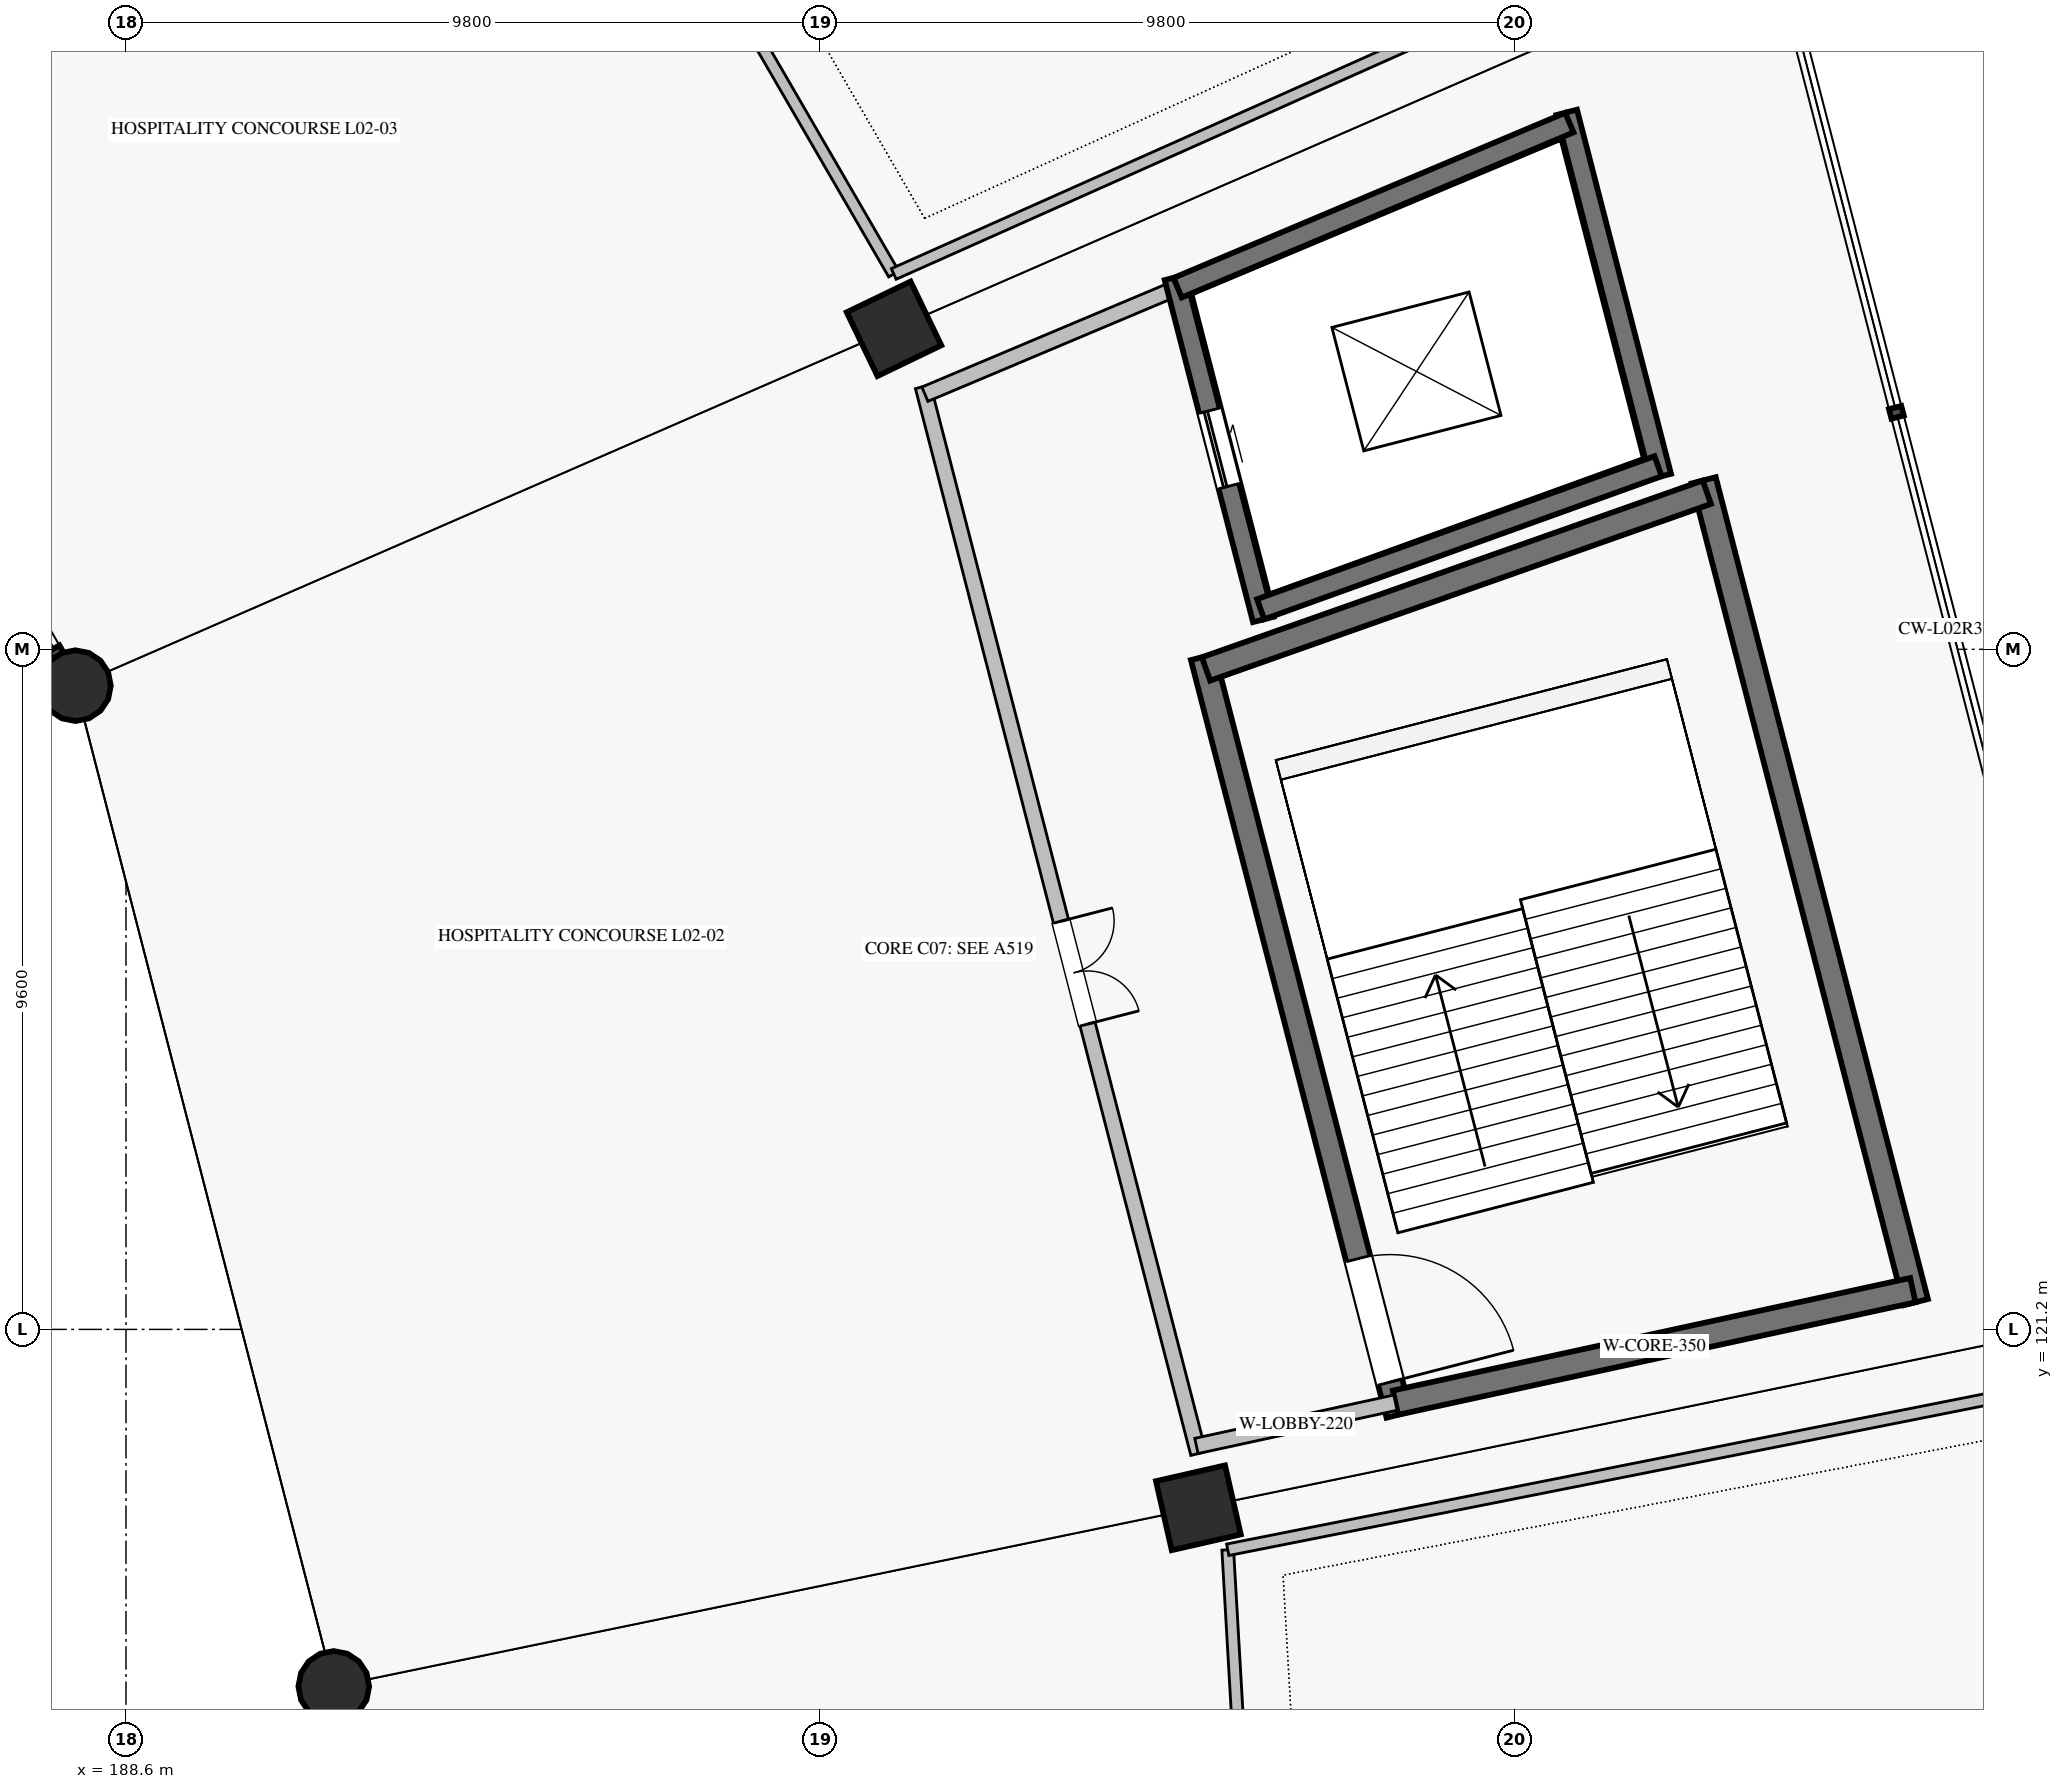
"""IFC4 building model, lengths in metres.
Left out: names, types, materials, properties, quantities, classifications, styles, units other than length and angle.
Written with IfcOpenShell. Run it as: python <this file> out.ifc"""

import sys

from ifc_helpers import new_model, si_unit, direction, frame, frame_2d, origin, origin_2d, place, context, subcontext, project, spatial, rectangle, circle, extrude, element, fill, save


model = new_model("IFC4")
c1 = context("Model", 3, precision=1e-05, world=origin(), true_north=direction((0.0, 1.0)))
c2 = subcontext(c1, "Body", "Model", "MODEL_VIEW")
j1 = project(units=[si_unit("LENGTHUNIT", "METRE"), si_unit("PLANEANGLEUNIT", "RADIAN")], contexts=[c1])
p1 = place(None, origin())
s1 = spatial("IfcSite", under=j1, at=p1, CompositionType="ELEMENT")
p2 = place(p1, origin())
s2 = spatial("IfcBuilding", under=s1, at=p2, CompositionType="ELEMENT")
p3 = place(p2, frame((0.0, 0.0, 10.54)))
s3 = spatial("IfcBuildingStorey", under=s2, at=p3, CompositionType="ELEMENT", Elevation=10.54)
for number, where, z_axis, x_axis in (
    (1, (191.533, 116.16, 0.0), (0.0, 0.0, 1.0), (0.975, 0.223, 0.0)),
    (2, (187.886, 130.287, 0.0), (0.0, 0.0, 1.0), (0.901, 0.434, 0.0)),
):
    element("IfcColumn", number, at=place(p3, frame(where, z_axis=z_axis, x_axis=x_axis)), inside=s3, PredefinedType="COLUMN", context=c2, shape_type="SweptSolid", body=[
        extrude(circle(Radius=0.5, at=origin_2d()), origin(), (0.0, 0.0, 1.0), 5.1),
    ])
for number, where, z_axis, x_axis in (
    (3, (203.738, 118.682, 0.0), (0.0, 0.0, 1.0), (0.975, 0.223, 0.0)),
    (4, (199.441, 135.325, 0.0), (0.0, 0.0, 1.0), (0.901, 0.434, 0.0)),
):
    element("IfcColumn", number, at=place(p3, frame(where, z_axis=z_axis, x_axis=x_axis)), inside=s3, PredefinedType="COLUMN", context=c2, shape_type="SweptSolid", body=[
        extrude(rectangle(XDim=1.0, YDim=1.0, at=origin_2d()), origin(), (0.0, 0.0, 1.0), 5.1),
    ])
p4 = place(p3, frame((206.562, 119.996, 0.0), z_axis=(0.0, 0.0, 1.0), x_axis=(-0.249959564539, 0.968256276042, 0.0)))
e5 = element("IfcWall", 5, at=p4, inside=s3, PredefinedType="SHEAR", context=c2, shape_type="SweptSolid", body=[
    extrude(rectangle(XDim=11.047, YDim=0.35, at=frame_2d((5.523, 0.0))), origin(), (0.0, 0.0, 1.0), 4.84),
])
p5 = place(p4, frame((0.475, 0.0, 0.0)))
e6 = element("IfcOpeningElement", 6, at=p5, cuts=e5, PredefinedType="OPENING", context=c2, shape_type="SweptSolid", body=[
    extrude(rectangle(XDim=1.8, YDim=2.2, at=frame_2d((0.9, 1.1))), frame((0.0, 0.185, 0.0), z_axis=(0.0, -1.0, 0.0), x_axis=(1.0, 0.0, 0.0)), (0.0, 0.0, 1.0), 0.37),
])
p6 = place(p3, frame((213.866, 121.585, 0.0), z_axis=(0.0, 0.0, 1.0), x_axis=(-0.249969221583, 0.968253782983, 0.0)))
e7 = element("IfcWall", 7, at=p6, inside=s3, PredefinedType="SHEAR", context=c2, shape_type="SweptSolid", body=[
    extrude(rectangle(XDim=11.982, YDim=0.35, at=frame_2d((5.991, 0.0))), origin(), (0.0, 0.0, 1.0), 4.84),
])
p7 = place(p3, frame((206.519, 120.166, 0.0), z_axis=(0.0, 0.0, 1.0), x_axis=(0.977149528138, 0.2125530514, 0.0)))
e8 = element("IfcWall", 8, at=p7, inside=s3, PredefinedType="SHEAR", context=c2, shape_type="SweptSolid", body=[
    extrude(rectangle(XDim=7.474, YDim=0.35, at=frame_2d((3.737, 0.0))), origin(), (0.0, 0.0, 1.0), 4.84),
])
p8 = place(p3, frame((203.845, 130.523, 0.0), z_axis=(0.0, 0.0, 1.0), x_axis=(0.943032412173, 0.332700871042, 0.0)))
e9 = element("IfcWall", 9, at=p8, inside=s3, PredefinedType="SHEAR", context=c2, shape_type="SweptSolid", body=[
    extrude(rectangle(XDim=7.497, YDim=0.35, at=frame_2d((3.748, 0.0))), origin(), (0.0, 0.0, 1.0), 4.84),
])
p9 = place(p3, frame((204.654, 131.221, 0.0), z_axis=(0.0, 0.0, 1.0), x_axis=(-0.250003862389, 0.968244839279, 0.0)))
e10 = element("IfcWall", 10, at=p9, inside=s3, PredefinedType="SHEAR", context=c2, shape_type="SweptSolid", body=[
    extrude(rectangle(XDim=4.987, YDim=0.3, at=frame_2d((2.494, 0.0))), origin(), (0.0, 0.0, 1.0), 4.84),
])
p10 = place(p9, frame((1.944, 0.0, 0.0)))
e11 = element("IfcOpeningElement", 11, at=p10, cuts=e10, PredefinedType="OPENING", context=c2, shape_type="SweptSolid", body=[
    extrude(rectangle(XDim=1.1, YDim=2.2, at=frame_2d((0.55, 1.1))), frame((0.0, 0.16, 0.0), z_axis=(0.0, -1.0, 0.0), x_axis=(1.0, 0.0, 0.0)), (0.0, 0.0, 1.0), 0.32),
])
p11 = place(p3, frame((210.264, 133.24, 0.0), z_axis=(0.0, 0.0, 1.0), x_axis=(-0.249961459705, 0.968255786795, 0.0)))
e12 = element("IfcWall", 12, at=p11, inside=s3, PredefinedType="SHEAR", context=c2, shape_type="SweptSolid", body=[
    extrude(rectangle(XDim=5.309, YDim=0.3, at=frame_2d((2.655, 0.0))), origin(), (0.0, 0.0, 1.0), 4.84),
])
p12 = place(p3, frame((204.616, 131.366, 0.0), z_axis=(0.0, 0.0, 1.0), x_axis=(0.940945340179, 0.338558513103, 0.0)))
e13 = element("IfcWall", 13, at=p12, inside=s3, PredefinedType="SHEAR", context=c2, shape_type="SweptSolid", body=[
    extrude(rectangle(XDim=5.962, YDim=0.3, at=frame_2d((2.981, 0.0))), origin(), (0.0, 0.0, 1.0), 4.84),
])
p13 = place(p3, frame((203.445, 135.905, 0.0), z_axis=(0.0, 0.0, 1.0), x_axis=(0.92149593043, 0.388388015007, 0.0)))
e14 = element("IfcWall", 14, at=p13, inside=s3, PredefinedType="SHEAR", context=c2, shape_type="SweptSolid", body=[
    extrude(rectangle(XDim=6.001, YDim=0.3, at=frame_2d((3.0, 0.0))), origin(), (0.0, 0.0, 1.0), 4.84),
])
p14 = place(p3, frame((203.737, 119.448, 0.0), z_axis=(0.0, 0.0, 1.0), x_axis=(-0.249963472505, 0.968255267176, 0.0)))
e15 = element("IfcWall", 15, at=p14, inside=s3, PredefinedType="SOLIDWALL", context=c2, shape_type="SweptSolid", body=[
    extrude(rectangle(XDim=15.553, YDim=0.22, at=frame_2d((7.776, 0.0))), origin(), (0.0, 0.0, 1.0), 3.788),
])
p15 = place(p14, frame((6.26, 0.0, 0.0)))
e16 = element("IfcOpeningElement", 16, at=p15, cuts=e15, PredefinedType="OPENING", context=c2, shape_type="SweptSolid", body=[
    extrude(rectangle(XDim=1.5, YDim=2.2, at=frame_2d((0.75, 1.1))), frame((0.0, 0.12, 0.0), z_axis=(0.0, -1.0, 0.0), x_axis=(1.0, 0.0, 0.0)), (0.0, 0.0, 1.0), 0.24),
])
p16 = place(p3, frame((203.71, 119.555, 0.0), z_axis=(0.0, 0.0, 1.0), x_axis=(0.977160263607, 0.212503692268, 0.0)))
e17 = element("IfcWall", 17, at=p16, inside=s3, PredefinedType="SOLIDWALL", context=c2, shape_type="SweptSolid", body=[
    extrude(rectangle(XDim=2.875, YDim=0.22, at=frame_2d((1.437, 0.0))), origin(), (0.0, 0.0, 1.0), 4.84),
])
p17 = place(p3, frame((199.877, 134.401, 0.0), z_axis=(0.0, 0.0, 1.0), x_axis=(0.921486922561, 0.388409386535, 0.0)))
e18 = element("IfcWall", 18, at=p17, inside=s3, PredefinedType="SOLIDWALL", context=c2, shape_type="SweptSolid", body=[
    extrude(rectangle(XDim=3.871, YDim=0.22, at=frame_2d((1.936, 0.0))), origin(), (0.0, 0.0, 1.0), 4.84),
])
p18 = place(p3, frame((205.041, 102.67, 0.0), z_axis=(0.0, 0.0, 1.0), x_axis=(-0.057603503798, 0.998339539611, 0.0)))
e19 = element("IfcWall", 19, at=p18, inside=s3, PredefinedType="PARTITIONING", context=c2, shape_type="SweptSolid", body=[
    extrude(rectangle(XDim=15.444, YDim=0.165, at=frame_2d((7.722, 0.0))), origin(), (0.0, 0.0, 1.0), 4.16),
])
p19 = place(p18, frame((6.922, 0.0, 0.0)))
e20 = element("IfcOpeningElement", 20, at=p19, cuts=e19, PredefinedType="OPENING", context=c2, shape_type="SweptSolid", body=[
    extrude(rectangle(XDim=1.6, YDim=2.3, at=frame_2d((0.8, 1.15))), frame((0.0, 0.093, 0.0), z_axis=(0.0, -1.0, 0.0), x_axis=(1.0, 0.0, 0.0)), (0.0, 0.0, 1.0), 0.185),
])
p20 = place(p3, frame((204.152, 118.089, 0.0), z_axis=(0.0, 0.0, 1.0), x_axis=(0.980904167784, 0.194491680088, 0.0)))
e21 = element("IfcWall", 21, at=p20, inside=s3, PredefinedType="PARTITIONING", context=c2, shape_type="SweptSolid", body=[
    extrude(rectangle(XDim=12.257, YDim=0.165, at=frame_2d((6.128, 0.0))), origin(), (0.0, 0.0, 1.0), 4.16),
])
p21 = place(p3, frame((199.438, 136.099, 0.0), z_axis=(0.0, 0.0, 1.0), x_axis=(-0.501617777052, 0.865089362867, 0.0)))
e22 = element("IfcWall", 22, at=p21, inside=s3, PredefinedType="PARTITIONING", context=c2, shape_type="SweptSolid", body=[
    extrude(rectangle(XDim=16.464, YDim=0.165, at=frame_2d((8.232, 0.0))), origin(), (0.0, 0.0, 1.0), 4.16),
])
p22 = place(p21, frame((7.582, 0.0, 0.0)))
e23 = element("IfcOpeningElement", 23, at=p22, cuts=e22, PredefinedType="OPENING", context=c2, shape_type="SweptSolid", body=[
    extrude(rectangle(XDim=1.3, YDim=2.15, at=frame_2d((0.65, 1.075))), frame((0.0, 0.093, 0.0), z_axis=(0.0, -1.0, 0.0), x_axis=(1.0, 0.0, 0.0)), (0.0, 0.0, 1.0), 0.185),
])
p23 = place(p3, frame((199.438, 136.099, 0.0), z_axis=(0.0, 0.0, 1.0), x_axis=(0.913245562849, 0.407409550621, 0.0)))
e24 = element("IfcWall", 24, at=p23, inside=s3, PredefinedType="PARTITIONING", context=c2, shape_type="SweptSolid", body=[
    extrude(rectangle(XDim=12.4, YDim=0.165, at=frame_2d((6.2, 0.0))), origin(), (0.0, 0.0, 1.0), 4.16),
])
p24 = place(p5, frame((1.8, 0.0, 0.0), z_axis=(0.0, 0.0, 1.0), x_axis=(-1.0, 0.0, 0.0)))
e25 = element("IfcDoor", 25, at=p24, inside=s3, OperationType="SINGLE_SWING_RIGHT", PredefinedType="DOOR", context=c2, shape_type="SweptSolid", body=[
    extrude(rectangle(XDim=1.8, YDim=2.2, at=frame_2d((0.9, 1.1))), frame((0.0, 0.025, 0.0), z_axis=(0.0, -1.0, 0.0), x_axis=(1.0, 0.0, 0.0)), (0.0, 0.0, 1.0), 0.05),
])
fill(e6, e25)
p25 = place(p10, origin())
e26 = element("IfcDoor", 26, at=p25, inside=s3, OperationType="SLIDING_TO_RIGHT", PredefinedType="DOOR", context=c2, shape_type="SweptSolid", body=[
    extrude(rectangle(XDim=1.1, YDim=2.2, at=frame_2d((0.55, 1.1))), frame((0.0, 0.025, 0.0), z_axis=(0.0, -1.0, 0.0), x_axis=(1.0, 0.0, 0.0)), (0.0, 0.0, 1.0), 0.05),
])
fill(e11, e26)
p26 = place(p15, frame((1.5, 0.0, 0.0), z_axis=(0.0, 0.0, 1.0), x_axis=(-1.0, 0.0, 0.0)))
e27 = element("IfcDoor", 27, at=p26, inside=s3, OperationType="DOUBLE_DOOR_SINGLE_SWING", PredefinedType="DOOR", context=c2, shape_type="SweptSolid", body=[
    extrude(rectangle(XDim=1.5, YDim=2.2, at=frame_2d((0.75, 1.1))), frame((0.0, 0.025, 0.0), z_axis=(0.0, -1.0, 0.0), x_axis=(1.0, 0.0, 0.0)), (0.0, 0.0, 1.0), 0.05),
])
fill(e16, e27)
save(model, sys.argv[1])
